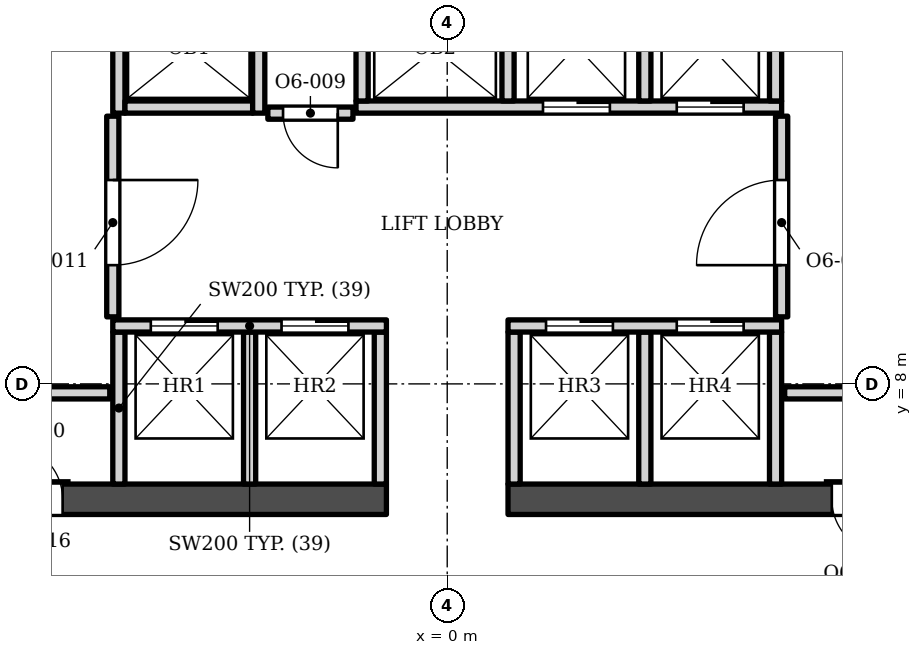
"""IFC4 building model, lengths in metres.
Left out: names, types, materials, properties, quantities, classifications, styles, units other than length and angle.
Written with IfcOpenShell. Run it as: python <this file> out.ifc"""

import sys

from ifc_helpers import new_model, si_unit, direction, frame, frame_2d, origin, place, context, subcontext, project, spatial, rectangle, extrude, element, fill, save


model = new_model("IFC4")
c1 = context("Model", 3, precision=1e-05, world=origin(), true_north=direction((0.0, 1.0)))
c2 = subcontext(c1, "Body", "Model", "MODEL_VIEW")
j1 = project(units=[si_unit("LENGTHUNIT", "METRE"), si_unit("PLANEANGLEUNIT", "RADIAN")], contexts=[c1])
p1 = place(None, origin())
s1 = spatial("IfcSite", under=j1, at=p1, CompositionType="ELEMENT")
p2 = place(p1, origin())
s2 = spatial("IfcBuilding", under=s1, at=p2, CompositionType="ELEMENT")
p3 = place(p2, frame((0.0, 0.0, 208.1)))
s3 = spatial("IfcBuildingStorey", under=s2, at=p3, CompositionType="ELEMENT", Elevation=208.1)
p4 = place(p3, frame((-8.05, 6.103, 0.0), z_axis=(0.0, 0.0, 1.0), x_axis=(1.0, 0.0, 0.0)))
e1 = element("IfcWall", 1, at=p4, inside=s3, PredefinedType="SHEAR", context=c2, shape_type="SweptSolid", body=[
    extrude(rectangle(XDim=7.05, YDim=0.5, at=frame_2d((3.525, 0.0))), origin(), (0.0, 0.0, 1.0), 3.9),
])
p5 = place(p4, frame((0.825, 0.0, 0.0)))
e2 = element("IfcOpeningElement", 2, at=p5, cuts=e1, PredefinedType="OPENING", context=c2, shape_type="SweptSolid", body=[
    extrude(rectangle(XDim=0.9, YDim=2.1, at=frame_2d((0.45, 1.05))), frame((0.0, 0.26, 0.0), z_axis=(0.0, -1.0, 0.0), x_axis=(1.0, 0.0, 0.0)), (0.0, 0.0, 1.0), 0.52),
])
p6 = place(p3, frame((1.0, 6.103, 0.0), z_axis=(0.0, 0.0, 1.0), x_axis=(1.0, 0.0, 0.0)))
e3 = element("IfcWall", 3, at=p6, inside=s3, PredefinedType="SHEAR", context=c2, shape_type="SweptSolid", body=[
    extrude(rectangle(XDim=7.05, YDim=0.5, at=frame_2d((3.525, 0.0))), origin(), (0.0, 0.0, 1.0), 3.9),
])
p7 = place(p6, frame((5.325, 0.0, 0.0)))
e4 = element("IfcOpeningElement", 4, at=p7, cuts=e3, PredefinedType="OPENING", context=c2, shape_type="SweptSolid", body=[
    extrude(rectangle(XDim=0.9, YDim=2.1, at=frame_2d((0.45, 1.05))), frame((0.0, 0.26, 0.0), z_axis=(0.0, -1.0, 0.0), x_axis=(1.0, 0.0, 0.0)), (0.0, 0.0, 1.0), 0.52),
])
for number, where, z_axis, x_axis in (
    (5, (-5.4, 6.353, 0.0), (0.0, 0.0, 1.0), (0.0, 1.0, 0.0)),
    (6, (-3.25, 6.353, 0.0), (0.0, 0.0, 1.0), (0.0, 1.0, 0.0)),
    (7, (-1.1, 6.353, 0.0), (0.0, 0.0, 1.0), (0.0, 1.0, 0.0)),
    (8, (1.1, 6.353, 0.0), (0.0, 0.0, 1.0), (0.0, 1.0, 0.0)),
    (9, (3.25, 6.353, 0.0), (0.0, 0.0, 1.0), (0.0, 1.0, 0.0)),
    (10, (5.4, 6.353, 0.0), (0.0, 0.0, 1.0), (0.0, 1.0, 0.0)),
    (11, (-8.05, 7.853, 0.0), (0.0, 0.0, 1.0), (1.0, 0.0, 0.0)),
    (12, (5.55, 7.853, 0.0), (0.0, 0.0, 1.0), (1.0, 0.0, 0.0)),
):
    element("IfcWall", number, at=place(p3, frame(where, z_axis=z_axis, x_axis=x_axis)), inside=s3, PredefinedType="SOLIDWALL", context=c2, shape_type="SweptSolid", body=[
        extrude(rectangle(XDim=2.5, YDim=0.2, at=frame_2d((1.25, 0.0))), origin(), (0.0, 0.0, 1.0), 3.73),
    ])
p8 = place(p3, frame((-5.5, 8.953, 0.0), z_axis=(0.0, 0.0, 1.0), x_axis=(1.0, 0.0, 0.0)))
e13 = element("IfcWall", 13, at=p8, inside=s3, PredefinedType="SOLIDWALL", context=c2, shape_type="SweptSolid", body=[
    extrude(rectangle(XDim=4.5, YDim=0.2, at=frame_2d((2.25, 0.0))), origin(), (0.0, 0.0, 1.0), 3.73),
])
p9 = place(p8, frame((0.625, 0.0, 0.0)))
e14 = element("IfcOpeningElement", 14, at=p9, cuts=e13, PredefinedType="OPENING", context=c2, shape_type="SweptSolid", body=[
    extrude(rectangle(XDim=1.1, YDim=2.1, at=frame_2d((0.55, 1.05))), frame((0.0, 0.11, 0.0), z_axis=(0.0, -1.0, 0.0), x_axis=(1.0, 0.0, 0.0)), (0.0, 0.0, 1.0), 0.22),
])
p10 = place(p8, frame((2.775, 0.0, 0.0)))
e15 = element("IfcOpeningElement", 15, at=p10, cuts=e13, PredefinedType="OPENING", context=c2, shape_type="SweptSolid", body=[
    extrude(rectangle(XDim=1.1, YDim=2.1, at=frame_2d((0.55, 1.05))), frame((0.0, 0.11, 0.0), z_axis=(0.0, -1.0, 0.0), x_axis=(1.0, 0.0, 0.0)), (0.0, 0.0, 1.0), 0.22),
])
p11 = place(p3, frame((1.0, 8.953, 0.0), z_axis=(0.0, 0.0, 1.0), x_axis=(1.0, 0.0, 0.0)))
e16 = element("IfcWall", 16, at=p11, inside=s3, PredefinedType="SOLIDWALL", context=c2, shape_type="SweptSolid", body=[
    extrude(rectangle(XDim=4.5, YDim=0.2, at=frame_2d((2.25, 0.0))), origin(), (0.0, 0.0, 1.0), 3.73),
])
p12 = place(p11, frame((0.625, 0.0, 0.0)))
e17 = element("IfcOpeningElement", 17, at=p12, cuts=e16, PredefinedType="OPENING", context=c2, shape_type="SweptSolid", body=[
    extrude(rectangle(XDim=1.1, YDim=2.1, at=frame_2d((0.55, 1.05))), frame((0.0, 0.11, 0.0), z_axis=(0.0, -1.0, 0.0), x_axis=(1.0, 0.0, 0.0)), (0.0, 0.0, 1.0), 0.22),
])
p13 = place(p11, frame((2.775, 0.0, 0.0)))
e18 = element("IfcOpeningElement", 18, at=p13, cuts=e16, PredefinedType="OPENING", context=c2, shape_type="SweptSolid", body=[
    extrude(rectangle(XDim=1.1, YDim=2.1, at=frame_2d((0.55, 1.05))), frame((0.0, 0.11, 0.0), z_axis=(0.0, -1.0, 0.0), x_axis=(1.0, 0.0, 0.0)), (0.0, 0.0, 1.0), 0.22),
])
p14 = place(p3, frame((-5.5, 9.103, 0.0), z_axis=(0.0, 0.0, 1.0), x_axis=(0.0, 1.0, 0.0)))
e19 = element("IfcWall", 19, at=p14, inside=s3, PredefinedType="SOLIDWALL", context=c2, shape_type="SweptSolid", body=[
    extrude(rectangle(XDim=3.3, YDim=0.2, at=frame_2d((1.65, 0.0))), origin(), (0.0, 0.0, 1.0), 3.73),
])
p15 = place(p14, frame((0.85, 0.0, 0.0)))
e20 = element("IfcOpeningElement", 20, at=p15, cuts=e19, PredefinedType="OPENING", context=c2, shape_type="SweptSolid", body=[
    extrude(rectangle(XDim=1.4, YDim=2.1, at=frame_2d((0.7, 1.05))), frame((0.0, 0.11, 0.0), z_axis=(0.0, -1.0, 0.0), x_axis=(1.0, 0.0, 0.0)), (0.0, 0.0, 1.0), 0.22),
])
p16 = place(p3, frame((5.5, 9.103, 0.0), z_axis=(0.0, 0.0, 1.0), x_axis=(0.0, 1.0, 0.0)))
e21 = element("IfcWall", 21, at=p16, inside=s3, PredefinedType="SOLIDWALL", context=c2, shape_type="SweptSolid", body=[
    extrude(rectangle(XDim=3.3, YDim=0.2, at=frame_2d((1.65, 0.0))), origin(), (0.0, 0.0, 1.0), 3.73),
])
p17 = place(p16, frame((0.85, 0.0, 0.0)))
e22 = element("IfcOpeningElement", 22, at=p17, cuts=e21, PredefinedType="OPENING", context=c2, shape_type="SweptSolid", body=[
    extrude(rectangle(XDim=1.4, YDim=2.1, at=frame_2d((0.7, 1.05))), frame((0.0, 0.11, 0.0), z_axis=(0.0, -1.0, 0.0), x_axis=(1.0, 0.0, 0.0)), (0.0, 0.0, 1.0), 0.22),
])
p18 = place(p3, frame((-2.95, 12.453, 0.0), z_axis=(0.0, 0.0, 1.0), x_axis=(1.0, 0.0, 0.0)))
e23 = element("IfcWall", 23, at=p18, inside=s3, PredefinedType="SOLIDWALL", context=c2, shape_type="SweptSolid", body=[
    extrude(rectangle(XDim=1.4, YDim=0.2, at=frame_2d((0.7, 0.0))), origin(), (0.0, 0.0, 1.0), 3.73),
])
p19 = place(p18, frame((0.25, 0.0, 0.0)))
e24 = element("IfcOpeningElement", 24, at=p19, cuts=e23, PredefinedType="OPENING", context=c2, shape_type="SweptSolid", body=[
    extrude(rectangle(XDim=0.9, YDim=2.1, at=frame_2d((0.45, 1.05))), frame((0.0, 0.11, 0.0), z_axis=(0.0, -1.0, 0.0), x_axis=(1.0, 0.0, 0.0)), (0.0, 0.0, 1.0), 0.22),
])
p20 = place(p3, frame((-5.4, 12.453, 0.0), z_axis=(0.0, 0.0, 1.0), x_axis=(0.0, 1.0, 0.0)))
e25 = element("IfcWall", 25, at=p20, inside=s3, PredefinedType="SOLIDWALL", context=c2, shape_type="SweptSolid", body=[
    extrude(rectangle(XDim=3.0, YDim=0.2, at=frame_2d((1.5, 0.0))), origin(), (0.0, 0.0, 1.0), 3.73),
])
p21 = place(p3, frame((-5.3, 12.552, 0.0), z_axis=(0.0, 0.0, 1.0), x_axis=(1.0, 0.0, 0.0)))
e26 = element("IfcWall", 26, at=p21, inside=s3, PredefinedType="SOLIDWALL", context=c2, shape_type="SweptSolid", body=[
    extrude(rectangle(XDim=2.1, YDim=0.2, at=frame_2d((1.05, 0.0))), origin(), (0.0, 0.0, 1.0), 3.73),
])
p22 = place(p3, frame((-3.1, 12.453, 0.0), z_axis=(0.0, 0.0, 1.0), x_axis=(0.0, 1.0, 0.0)))
e27 = element("IfcWall", 27, at=p22, inside=s3, PredefinedType="SOLIDWALL", context=c2, shape_type="SweptSolid", body=[
    extrude(rectangle(XDim=3.0, YDim=0.2, at=frame_2d((1.5, 0.0))), origin(), (0.0, 0.0, 1.0), 3.73),
])
p23 = place(p3, frame((-1.5, 12.552, 0.0), z_axis=(0.0, 0.0, 1.0), x_axis=(1.0, 0.0, 0.0)))
e28 = element("IfcWall", 28, at=p23, inside=s3, PredefinedType="SOLIDWALL", context=c2, shape_type="SweptSolid", body=[
    extrude(rectangle(XDim=7.0, YDim=0.2, at=frame_2d((3.5, 0.0))), origin(), (0.0, 0.0, 1.0), 3.73),
])
p24 = place(p23, frame((3.075, 0.0, 0.0)))
e29 = element("IfcOpeningElement", 29, at=p24, cuts=e28, PredefinedType="OPENING", context=c2, shape_type="SweptSolid", body=[
    extrude(rectangle(XDim=1.1, YDim=2.1, at=frame_2d((0.55, 1.05))), frame((0.0, 0.11, 0.0), z_axis=(0.0, -1.0, 0.0), x_axis=(1.0, 0.0, 0.0)), (0.0, 0.0, 1.0), 0.22),
])
p25 = place(p23, frame((5.275, 0.0, 0.0)))
e30 = element("IfcOpeningElement", 30, at=p25, cuts=e28, PredefinedType="OPENING", context=c2, shape_type="SweptSolid", body=[
    extrude(rectangle(XDim=1.1, YDim=2.1, at=frame_2d((0.55, 1.05))), frame((0.0, 0.11, 0.0), z_axis=(0.0, -1.0, 0.0), x_axis=(1.0, 0.0, 0.0)), (0.0, 0.0, 1.0), 0.22),
])
for number, where, z_axis, x_axis in (
    (31, (-1.4, 12.653, 0.0), (0.0, 0.0, 1.0), (0.0, 1.0, 0.0)),
    (32, (1.0, 12.653, 0.0), (0.0, 0.0, 1.0), (0.0, 1.0, 0.0)),
    (33, (3.25, 12.653, 0.0), (0.0, 0.0, 1.0), (0.0, 1.0, 0.0)),
):
    element("IfcWall", number, at=place(p3, frame(where, z_axis=z_axis, x_axis=x_axis)), inside=s3, PredefinedType="SOLIDWALL", context=c2, shape_type="SweptSolid", body=[
        extrude(rectangle(XDim=2.6, YDim=0.2, at=frame_2d((1.3, 0.0))), origin(), (0.0, 0.0, 1.0), 3.73),
    ])
p26 = place(p3, frame((5.4, 12.653, 0.0), z_axis=(0.0, 0.0, 1.0), x_axis=(0.0, 1.0, 0.0)))
e34 = element("IfcWall", 34, at=p26, inside=s3, PredefinedType="SOLIDWALL", context=c2, shape_type="SweptSolid", body=[
    extrude(rectangle(XDim=1.6, YDim=0.2, at=frame_2d((0.8, 0.0))), origin(), (0.0, 0.0, 1.0), 3.73),
])
p27 = place(p9, origin())
e35 = element("IfcDoor", 35, at=p27, inside=s3, OperationType="DOUBLE_DOOR_SLIDING", PredefinedType="DOOR", context=c2, shape_type="SweptSolid", body=[
    extrude(rectangle(XDim=1.1, YDim=2.1, at=frame_2d((0.55, 1.05))), frame((0.0, 0.025, 0.0), z_axis=(0.0, -1.0, 0.0), x_axis=(1.0, 0.0, 0.0)), (0.0, 0.0, 1.0), 0.05),
])
fill(e14, e35)
p28 = place(p10, origin())
e36 = element("IfcDoor", 36, at=p28, inside=s3, OperationType="DOUBLE_DOOR_SLIDING", PredefinedType="DOOR", context=c2, shape_type="SweptSolid", body=[
    extrude(rectangle(XDim=1.1, YDim=2.1, at=frame_2d((0.55, 1.05))), frame((0.0, 0.025, 0.0), z_axis=(0.0, -1.0, 0.0), x_axis=(1.0, 0.0, 0.0)), (0.0, 0.0, 1.0), 0.05),
])
fill(e15, e36)
p29 = place(p12, origin())
e37 = element("IfcDoor", 37, at=p29, inside=s3, OperationType="DOUBLE_DOOR_SLIDING", PredefinedType="DOOR", context=c2, shape_type="SweptSolid", body=[
    extrude(rectangle(XDim=1.1, YDim=2.1, at=frame_2d((0.55, 1.05))), frame((0.0, 0.025, 0.0), z_axis=(0.0, -1.0, 0.0), x_axis=(1.0, 0.0, 0.0)), (0.0, 0.0, 1.0), 0.05),
])
fill(e17, e37)
p30 = place(p13, origin())
e38 = element("IfcDoor", 38, at=p30, inside=s3, OperationType="DOUBLE_DOOR_SLIDING", PredefinedType="DOOR", context=c2, shape_type="SweptSolid", body=[
    extrude(rectangle(XDim=1.1, YDim=2.1, at=frame_2d((0.55, 1.05))), frame((0.0, 0.025, 0.0), z_axis=(0.0, -1.0, 0.0), x_axis=(1.0, 0.0, 0.0)), (0.0, 0.0, 1.0), 0.05),
])
fill(e18, e38)
p31 = place(p24, origin())
e39 = element("IfcDoor", 39, at=p31, inside=s3, OperationType="DOUBLE_DOOR_SLIDING", PredefinedType="DOOR", context=c2, shape_type="SweptSolid", body=[
    extrude(rectangle(XDim=1.1, YDim=2.1, at=frame_2d((0.55, 1.05))), frame((0.0, 0.025, 0.0), z_axis=(0.0, -1.0, 0.0), x_axis=(1.0, 0.0, 0.0)), (0.0, 0.0, 1.0), 0.05),
])
fill(e29, e39)
p32 = place(p25, origin())
e40 = element("IfcDoor", 40, at=p32, inside=s3, OperationType="DOUBLE_DOOR_SLIDING", PredefinedType="DOOR", context=c2, shape_type="SweptSolid", body=[
    extrude(rectangle(XDim=1.1, YDim=2.1, at=frame_2d((0.55, 1.05))), frame((0.0, 0.025, 0.0), z_axis=(0.0, -1.0, 0.0), x_axis=(1.0, 0.0, 0.0)), (0.0, 0.0, 1.0), 0.05),
])
fill(e30, e40)
p33 = place(p19, origin())
e41 = element("IfcDoor", 41, at=p33, inside=s3, OperationType="SINGLE_SWING_RIGHT", PredefinedType="DOOR", context=c2, shape_type="SweptSolid", body=[
    extrude(rectangle(XDim=0.9, YDim=2.1, at=frame_2d((0.45, 1.05))), frame((0.0, 0.025, 0.0), z_axis=(0.0, -1.0, 0.0), x_axis=(1.0, 0.0, 0.0)), (0.0, 0.0, 1.0), 0.05),
])
fill(e24, e41)
p34 = place(p15, origin())
e42 = element("IfcDoor", 42, at=p34, inside=s3, OperationType="SINGLE_SWING_RIGHT", PredefinedType="DOOR", context=c2, shape_type="SweptSolid", body=[
    extrude(rectangle(XDim=1.4, YDim=2.1, at=frame_2d((0.7, 1.05))), frame((0.0, 0.025, 0.0), z_axis=(0.0, -1.0, 0.0), x_axis=(1.0, 0.0, 0.0)), (0.0, 0.0, 1.0), 0.05),
])
fill(e20, e42)
p35 = place(p17, origin())
e43 = element("IfcDoor", 43, at=p35, inside=s3, OperationType="SINGLE_SWING_LEFT", PredefinedType="DOOR", context=c2, shape_type="SweptSolid", body=[
    extrude(rectangle(XDim=1.4, YDim=2.1, at=frame_2d((0.7, 1.05))), frame((0.0, 0.025, 0.0), z_axis=(0.0, -1.0, 0.0), x_axis=(1.0, 0.0, 0.0)), (0.0, 0.0, 1.0), 0.05),
])
fill(e22, e43)
p36 = place(p5, origin())
e44 = element("IfcDoor", 44, at=p36, inside=s3, OperationType="SINGLE_SWING_LEFT", PredefinedType="DOOR", context=c2, shape_type="SweptSolid", body=[
    extrude(rectangle(XDim=0.9, YDim=2.1, at=frame_2d((0.45, 1.05))), frame((0.0, 0.025, 0.0), z_axis=(0.0, -1.0, 0.0), x_axis=(1.0, 0.0, 0.0)), (0.0, 0.0, 1.0), 0.05),
])
fill(e2, e44)
p37 = place(p7, origin())
e45 = element("IfcDoor", 45, at=p37, inside=s3, OperationType="SINGLE_SWING_RIGHT", PredefinedType="DOOR", context=c2, shape_type="SweptSolid", body=[
    extrude(rectangle(XDim=0.9, YDim=2.1, at=frame_2d((0.45, 1.05))), frame((0.0, 0.025, 0.0), z_axis=(0.0, -1.0, 0.0), x_axis=(1.0, 0.0, 0.0)), (0.0, 0.0, 1.0), 0.05),
])
fill(e4, e45)
save(model, sys.argv[1])
